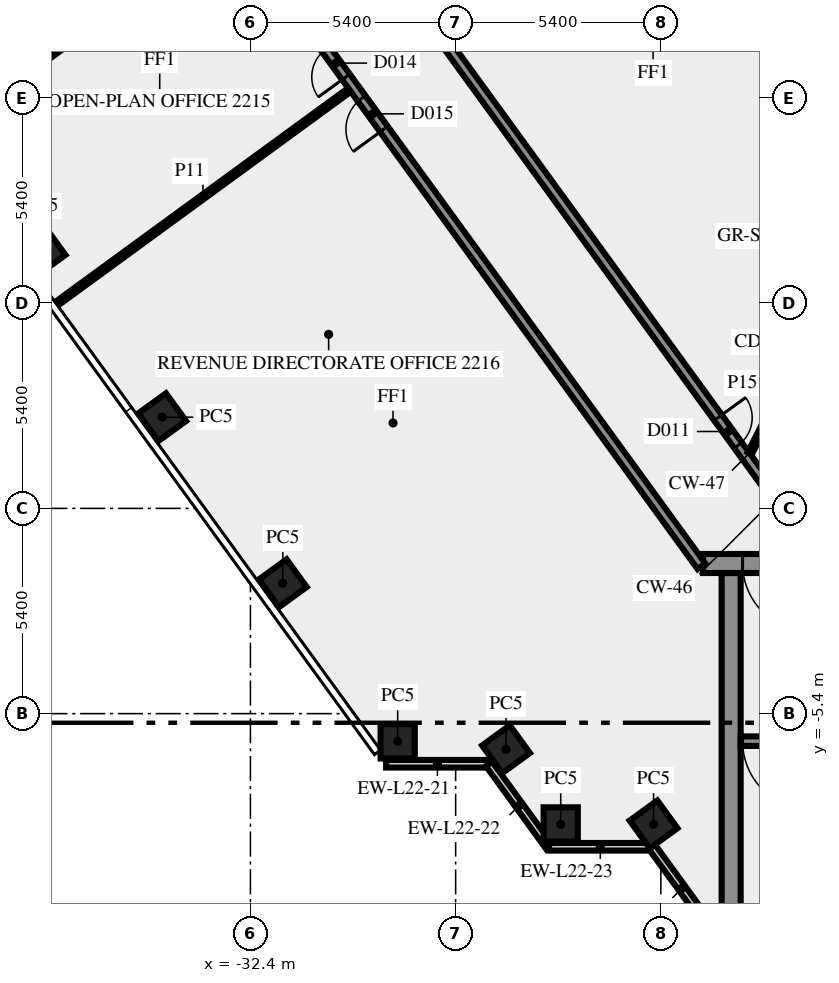
"""IFC4 building model, lengths in metres.
Left out: names, types, materials, properties, quantities, classifications, styles, units other than length and angle.
Written with IfcOpenShell. Run it as: python <this file> out.ifc"""

import sys

from ifc_helpers import new_model, si_unit, direction, frame, frame_2d, origin, origin_2d, place, context, subcontext, project, spatial, rectangle, extrude, element, fill, save


model = new_model("IFC4")
c1 = context("Model", 3, precision=1e-05, world=origin(), true_north=direction((0.0, 1.0)))
c2 = subcontext(c1, "Body", "Model", "MODEL_VIEW")
j1 = project(units=[si_unit("LENGTHUNIT", "METRE"), si_unit("PLANEANGLEUNIT", "RADIAN")], contexts=[c1])
p1 = place(None, origin())
s1 = spatial("IfcSite", under=j1, at=p1, CompositionType="ELEMENT")
p2 = place(p1, origin())
s2 = spatial("IfcBuilding", under=s1, at=p2, CompositionType="ELEMENT")
p3 = place(p2, frame((0.0, 0.0, 97.0)))
s3 = spatial("IfcBuildingStorey", under=s2, at=p3, CompositionType="ELEMENT", Elevation=97.0)
for number, where, z_axis, x_axis in (
    (1, (-37.896, 6.769, 0.0), (0.0, 0.0, 1.0), (0.588, -0.809, 0.0)),
    (2, (-34.722, 2.4, 0.0), (0.0, 0.0, 1.0), (0.588, -0.809, 0.0)),
    (3, (-31.548, -1.969, 0.0), (0.0, 0.0, 1.0), (0.588, -0.809, 0.0)),
    (4, (-28.525, -6.13, 0.0), (0.0, 0.0, 1.0), (1.0, 0.0, 0.0)),
    (5, (-25.674, -6.337, 0.0), (0.0, 0.0, 1.0), (0.588, -0.809, 0.0)),
    (6, (-24.235, -8.315, 0.0), (0.0, 0.0, 1.0), (1.0, 0.0, 0.0)),
    (7, (-21.792, -8.315, 0.0), (0.0, 0.0, 1.0), (0.588, -0.809, 0.0)),
):
    element("IfcColumn", number, at=place(p3, frame(where, z_axis=z_axis, x_axis=x_axis)), inside=s3, PredefinedType="COLUMN", context=c2, shape_type="SweptSolid", body=[
        extrude(rectangle(XDim=0.9, YDim=0.9, at=origin_2d()), origin(), (0.0, 0.0, 1.0), 3.65),
    ])
p4 = place(p3, frame((-28.83, -6.719, 0.0), z_axis=(0.0, 0.0, 1.0), x_axis=(1.0, 0.0, 0.0)))
e8 = element("IfcWall", 8, at=p4, inside=s3, PredefinedType="SOLIDWALL", context=c2, shape_type="SweptSolid", body=[
    extrude(rectangle(XDim=2.7, YDim=0.2, at=frame_2d((1.35, 0.0))), origin(), (0.0, 0.0, 1.0), 3.65),
])
p5 = place(p3, frame((-26.12, -6.724, 0.0), z_axis=(0.0, 0.0, 1.0), x_axis=(0.587720002413, -0.809064397168, 0.0)))
e9 = element("IfcWall", 9, at=p5, inside=s3, PredefinedType="SOLIDWALL", context=c2, shape_type="SweptSolid", body=[
    extrude(rectangle(XDim=2.7, YDim=0.2, at=frame_2d((1.35, 0.0))), origin(), (0.0, 0.0, 1.0), 3.65),
])
p6 = place(p3, frame((-24.543, -8.904, 0.0), z_axis=(0.0, 0.0, 1.0), x_axis=(1.0, 0.0, 0.0)))
e10 = element("IfcWall", 10, at=p6, inside=s3, PredefinedType="SOLIDWALL", context=c2, shape_type="SweptSolid", body=[
    extrude(rectangle(XDim=2.7, YDim=0.2, at=frame_2d((1.35, 0.0))), origin(), (0.0, 0.0, 1.0), 3.65),
])
p7 = place(p3, frame((-21.833, -8.909, 0.0), z_axis=(0.0, 0.0, 1.0), x_axis=(0.587766567315, -0.809030569476, 0.0)))
e11 = element("IfcWall", 11, at=p7, inside=s3, PredefinedType="SOLIDWALL", context=c2, shape_type="SweptSolid", body=[
    extrude(rectangle(XDim=2.688, YDim=0.2, at=frame_2d((1.344, 0.0))), origin(), (0.0, 0.0, 1.0), 3.65),
])
p8 = place(p3, frame((-19.75, -10.5, 0.0), z_axis=(0.0, 0.0, 1.0), x_axis=(0.0, 1.0, 0.0)))
e12 = element("IfcWall", 12, at=p8, inside=s3, PredefinedType="SHEAR", context=c2, shape_type="SweptSolid", body=[
    extrude(rectangle(XDim=8.8, YDim=0.5, at=frame_2d((4.4, 0.0))), origin(), (0.0, 0.0, 1.0), 3.65),
])
p9 = place(p3, frame((-11.45, -6.125, 0.0), z_axis=(0.0, 0.0, 1.0), x_axis=(-1.0, 0.0, 0.0)))
e13 = element("IfcWall", 13, at=p9, inside=s3, PredefinedType="SHEAR", context=c2, shape_type="SweptSolid", body=[
    extrude(rectangle(XDim=8.05, YDim=0.25, at=frame_2d((4.025, 0.0))), origin(), (0.0, 0.0, 1.0), 3.65),
])
p10 = place(p9, frame((6.2, 0.0, 0.0)))
e14 = element("IfcOpeningElement", 14, at=p10, cuts=e13, PredefinedType="OPENING", context=c2, shape_type="SweptSolid", body=[
    extrude(rectangle(XDim=1.8, YDim=2.1, at=frame_2d((0.9, 1.05))), frame((0.0, 0.135, 0.0), z_axis=(0.0, -1.0, 0.0), x_axis=(1.0, 0.0, 0.0)), (0.0, 0.0, 1.0), 0.27),
])
p11 = place(p3, frame((20.49, -1.45, 0.0), z_axis=(0.0, 0.0, 1.0), x_axis=(-1.0, 0.0, 0.0)))
e15 = element("IfcWall", 15, at=p11, inside=s3, PredefinedType="SHEAR", context=c2, shape_type="SweptSolid", body=[
    extrude(rectangle(XDim=40.98, YDim=0.5, at=frame_2d((20.49, 0.0))), origin(), (0.0, 0.0, 1.0), 3.65),
])
p12 = place(p11, frame((38.14, 0.0, 0.0)))
e16 = element("IfcOpeningElement", 16, at=p12, cuts=e15, PredefinedType="OPENING", context=c2, shape_type="SweptSolid", body=[
    extrude(rectangle(XDim=1.8, YDim=2.1, at=frame_2d((0.9, 1.05))), frame((0.0, 0.26, 0.0), z_axis=(0.0, -1.0, 0.0), x_axis=(1.0, 0.0, 0.0)), (0.0, 0.0, 1.0), 0.52),
])
p13 = place(p11, frame((36.728, 0.0, 0.0)))
e17 = element("IfcOpeningElement", 17, at=p13, cuts=e15, PredefinedType="OPENING", context=c2, shape_type="SweptSolid", body=[
    extrude(rectangle(XDim=0.8, YDim=2.1, at=frame_2d((0.4, 1.05))), frame((0.0, 0.26, 0.0), z_axis=(0.0, -1.0, 0.0), x_axis=(1.0, 0.0, 0.0)), (0.0, 0.0, 1.0), 0.52),
])
p14 = place(p11, frame((35.153, 0.0, 0.0)))
e18 = element("IfcOpeningElement", 18, at=p14, cuts=e15, PredefinedType="OPENING", context=c2, shape_type="SweptSolid", body=[
    extrude(rectangle(XDim=0.8, YDim=2.1, at=frame_2d((0.4, 1.05))), frame((0.0, 0.26, 0.0), z_axis=(0.0, -1.0, 0.0), x_axis=(1.0, 0.0, 0.0)), (0.0, 0.0, 1.0), 0.52),
])
p15 = place(p11, frame((32.94, 0.0, 0.0)))
e19 = element("IfcOpeningElement", 19, at=p15, cuts=e15, PredefinedType="OPENING", context=c2, shape_type="SweptSolid", body=[
    extrude(rectangle(XDim=0.9, YDim=2.1, at=frame_2d((0.45, 1.05))), frame((0.0, 0.26, 0.0), z_axis=(0.0, -1.0, 0.0), x_axis=(1.0, 0.0, 0.0)), (0.0, 0.0, 1.0), 0.52),
])
p16 = place(p11, frame((19.59, 0.0, 0.0)))
e20 = element("IfcOpeningElement", 20, at=p16, cuts=e15, PredefinedType="OPENING", context=c2, shape_type="SweptSolid", body=[
    extrude(rectangle(XDim=2.0, YDim=2.1, at=frame_2d((1.0, 1.05))), frame((0.0, 0.26, 0.0), z_axis=(0.0, -1.0, 0.0), x_axis=(1.0, 0.0, 0.0)), (0.0, 0.0, 1.0), 0.52),
])
p17 = place(p11, frame((7.14, 0.0, 0.0)))
e21 = element("IfcOpeningElement", 21, at=p17, cuts=e15, PredefinedType="OPENING", context=c2, shape_type="SweptSolid", body=[
    extrude(rectangle(XDim=0.9, YDim=2.1, at=frame_2d((0.45, 1.05))), frame((0.0, 0.26, 0.0), z_axis=(0.0, -1.0, 0.0), x_axis=(1.0, 0.0, 0.0)), (0.0, 0.0, 1.0), 0.52),
])
p18 = place(p11, frame((4.19, 0.0, 0.0)))
e22 = element("IfcOpeningElement", 22, at=p18, cuts=e15, PredefinedType="OPENING", context=c2, shape_type="SweptSolid", body=[
    extrude(rectangle(XDim=0.9, YDim=2.1, at=frame_2d((0.45, 1.05))), frame((0.0, 0.26, 0.0), z_axis=(0.0, -1.0, 0.0), x_axis=(1.0, 0.0, 0.0)), (0.0, 0.0, 1.0), 0.52),
])
p19 = place(p11, frame((1.04, 0.0, 0.0)))
e23 = element("IfcOpeningElement", 23, at=p19, cuts=e15, PredefinedType="OPENING", context=c2, shape_type="SweptSolid", body=[
    extrude(rectangle(XDim=1.8, YDim=2.1, at=frame_2d((0.9, 1.05))), frame((0.0, 0.26, 0.0), z_axis=(0.0, -1.0, 0.0), x_axis=(1.0, 0.0, 0.0)), (0.0, 0.0, 1.0), 0.52),
])
p20 = place(p3, frame((-20.531, -1.523, 0.0), z_axis=(0.0, 0.0, 1.0), x_axis=(-0.587784593204, 0.809017473231, 0.0)))
e24 = element("IfcWall", 24, at=p20, inside=s3, PredefinedType="SOLIDWALL", context=c2, shape_type="SweptSolid", body=[
    extrude(rectangle(XDim=44.67, YDim=0.25, at=frame_2d((22.335, 0.0))), origin(), (0.0, 0.0, 1.0), 3.65),
])
p21 = place(p20, frame((43.296, 0.0, 0.0)))
e25 = element("IfcOpeningElement", 25, at=p21, cuts=e24, PredefinedType="OPENING", context=c2, shape_type="SweptSolid", body=[
    extrude(rectangle(XDim=0.9, YDim=2.1, at=frame_2d((0.45, 1.05))), frame((0.0, 0.135, 0.0), z_axis=(0.0, -1.0, 0.0), x_axis=(1.0, 0.0, 0.0)), (0.0, 0.0, 1.0), 0.27),
])
p22 = place(p20, frame((15.916, 0.0, 0.0)))
e26 = element("IfcOpeningElement", 26, at=p22, cuts=e24, PredefinedType="OPENING", context=c2, shape_type="SweptSolid", body=[
    extrude(rectangle(XDim=0.9, YDim=2.1, at=frame_2d((0.45, 1.05))), frame((0.0, 0.135, 0.0), z_axis=(0.0, -1.0, 0.0), x_axis=(1.0, 0.0, 0.0)), (0.0, 0.0, 1.0), 0.27),
])
p23 = place(p20, frame((33.116, 0.0, 0.0)))
e27 = element("IfcOpeningElement", 27, at=p23, cuts=e24, PredefinedType="OPENING", context=c2, shape_type="SweptSolid", body=[
    extrude(rectangle(XDim=1.0, YDim=2.1, at=frame_2d((0.5, 1.05))), frame((0.0, 0.135, 0.0), z_axis=(0.0, -1.0, 0.0), x_axis=(1.0, 0.0, 0.0)), (0.0, 0.0, 1.0), 0.27),
])
p24 = place(p20, frame((14.216, 0.0, 0.0)))
e28 = element("IfcOpeningElement", 28, at=p24, cuts=e24, PredefinedType="OPENING", context=c2, shape_type="SweptSolid", body=[
    extrude(rectangle(XDim=1.0, YDim=2.1, at=frame_2d((0.5, 1.05))), frame((0.0, 0.135, 0.0), z_axis=(0.0, -1.0, 0.0), x_axis=(1.0, 0.0, 0.0)), (0.0, 0.0, 1.0), 0.27),
])
p25 = place(p3, frame((-37.232, 25.972, 0.0), z_axis=(0.0, 0.0, 1.0), x_axis=(0.587786323093, -0.809016216391, 0.0)))
e29 = element("IfcWall", 29, at=p25, inside=s3, PredefinedType="SOLIDWALL", context=c2, shape_type="SweptSolid", body=[
    extrude(rectangle(XDim=33.493, YDim=0.25, at=frame_2d((16.747, 0.0))), origin(), (0.0, 0.0, 1.0), 3.65),
])
p26 = place(p25, frame((13.185, 0.0, 0.0)))
e30 = element("IfcOpeningElement", 30, at=p26, cuts=e29, PredefinedType="OPENING", context=c2, shape_type="SweptSolid", body=[
    extrude(rectangle(XDim=1.2, YDim=2.1, at=frame_2d((0.6, 1.05))), frame((0.0, 0.135, 0.0), z_axis=(0.0, -1.0, 0.0), x_axis=(1.0, 0.0, 0.0)), (0.0, 0.0, 1.0), 0.27),
])
p27 = place(p25, frame((29.152, 0.0, 0.0)))
e31 = element("IfcOpeningElement", 31, at=p27, cuts=e29, PredefinedType="OPENING", context=c2, shape_type="SweptSolid", body=[
    extrude(rectangle(XDim=0.9, YDim=2.1, at=frame_2d((0.45, 1.05))), frame((0.0, 0.135, 0.0), z_axis=(0.0, -1.0, 0.0), x_axis=(1.0, 0.0, 0.0)), (0.0, 0.0, 1.0), 0.27),
])
p28 = place(p3, frame((-32.943, 15.349, 0.0), z_axis=(0.0, 0.0, 1.0), x_axis=(-0.80903787798, -0.587756507402, 0.0)))
e32 = element("IfcWall", 32, at=p28, inside=s3, PredefinedType="PARTITIONING", context=c2, shape_type="SweptSolid", body=[
    extrude(rectangle(XDim=9.652, YDim=0.12, at=frame_2d((4.826, 0.0))), origin(), (0.0, 0.0, 1.0), 2.75),
])
p29 = place(p3, frame((-37.506, 5.381, 0.0), z_axis=(0.0, 0.0, 1.0), x_axis=(0.807645841498, 0.589667868135, 0.0)))
e33 = element("IfcWall", 33, at=p29, inside=s3, PredefinedType="PARTITIONING", context=c2, shape_type="SweptSolid", body=[
    extrude(rectangle(XDim=9.551, YDim=0.12, at=frame_2d((4.775, 0.0))), origin(), (0.0, 0.0, 1.0), 2.75),
])
p30 = place(p3, frame((-19.261, 1.45, 0.0), z_axis=(0.0, 0.0, 1.0), x_axis=(0.453950796792, 0.891026752736, 0.0)))
e34 = element("IfcWall", 34, at=p30, inside=s3, PredefinedType="PARTITIONING", context=c2, shape_type="SweptSolid", body=[
    extrude(rectangle(XDim=2.778, YDim=0.12, at=frame_2d((1.389, 0.0))), origin(), (0.0, 0.0, 1.0), 3.65),
])
p31 = place(p10, origin())
e35 = element("IfcDoor", 35, at=p31, inside=s3, OperationType="DOUBLE_DOOR_SINGLE_SWING", PredefinedType="DOOR", context=c2, shape_type="SweptSolid", body=[
    extrude(rectangle(XDim=1.8, YDim=2.1, at=frame_2d((0.9, 1.05))), frame((0.0, 0.025, 0.0), z_axis=(0.0, -1.0, 0.0), x_axis=(1.0, 0.0, 0.0)), (0.0, 0.0, 1.0), 0.05),
])
fill(e14, e35)
p32 = place(p12, origin())
e36 = element("IfcDoor", 36, at=p32, inside=s3, OperationType="DOUBLE_DOOR_SINGLE_SWING", PredefinedType="DOOR", context=c2, shape_type="SweptSolid", body=[
    extrude(rectangle(XDim=1.8, YDim=2.1, at=frame_2d((0.9, 1.05))), frame((0.0, 0.025, 0.0), z_axis=(0.0, -1.0, 0.0), x_axis=(1.0, 0.0, 0.0)), (0.0, 0.0, 1.0), 0.05),
])
fill(e16, e36)
p33 = place(p22, origin())
e37 = element("IfcDoor", 37, at=p33, inside=s3, OperationType="SINGLE_SWING_LEFT", PredefinedType="DOOR", context=c2, shape_type="SweptSolid", body=[
    extrude(rectangle(XDim=0.9, YDim=2.1, at=frame_2d((0.45, 1.05))), frame((0.0, 0.025, 0.0), z_axis=(0.0, -1.0, 0.0), x_axis=(1.0, 0.0, 0.0)), (0.0, 0.0, 1.0), 0.05),
])
fill(e26, e37)
p34 = place(p24, origin())
e38 = element("IfcDoor", 38, at=p34, inside=s3, OperationType="SINGLE_SWING_RIGHT", PredefinedType="DOOR", context=c2, shape_type="SweptSolid", body=[
    extrude(rectangle(XDim=1.0, YDim=2.1, at=frame_2d((0.5, 1.05))), frame((0.0, 0.025, 0.0), z_axis=(0.0, -1.0, 0.0), x_axis=(1.0, 0.0, 0.0)), (0.0, 0.0, 1.0), 0.05),
])
fill(e28, e38)
p35 = place(p27, origin())
e39 = element("IfcDoor", 39, at=p35, inside=s3, OperationType="SINGLE_SWING_RIGHT", PredefinedType="DOOR", context=c2, shape_type="SweptSolid", body=[
    extrude(rectangle(XDim=0.9, YDim=2.1, at=frame_2d((0.45, 1.05))), frame((0.0, 0.025, 0.0), z_axis=(0.0, -1.0, 0.0), x_axis=(1.0, 0.0, 0.0)), (0.0, 0.0, 1.0), 0.05),
])
fill(e31, e39)
save(model, sys.argv[1])
